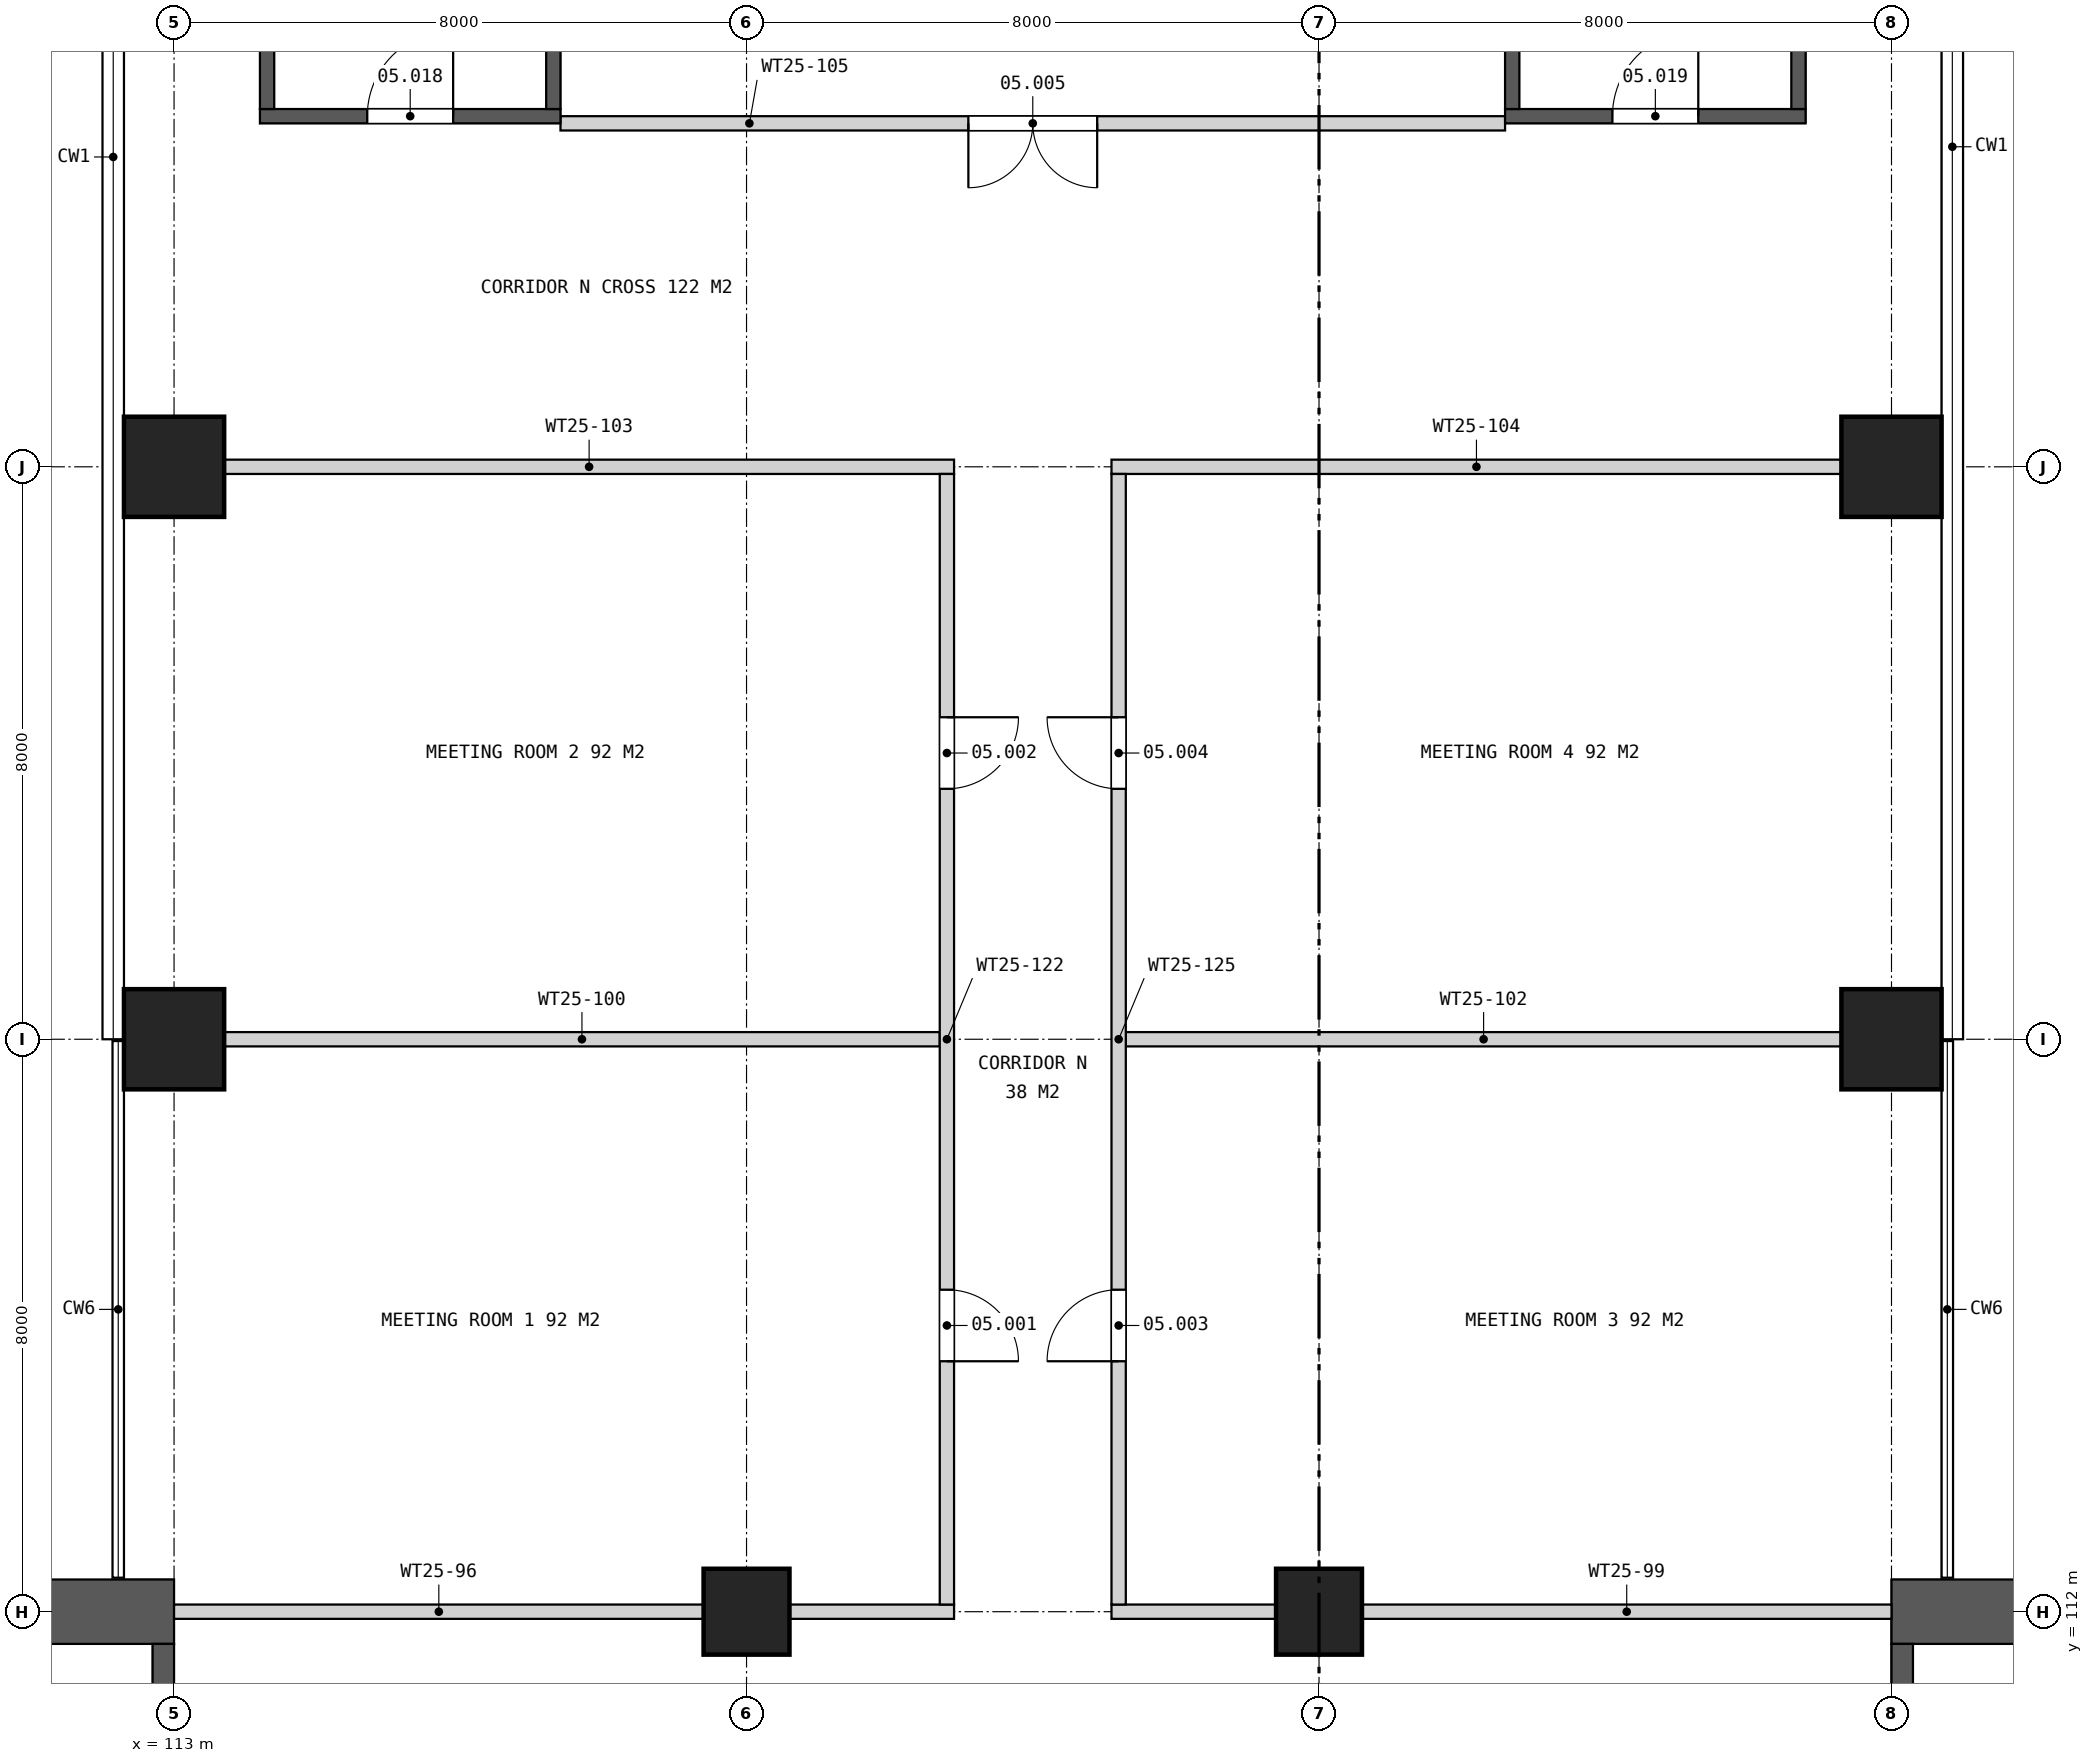
"""IFC4 building model, lengths in metres.
Left out: names, types, materials, properties, quantities, classifications, styles, units other than length and angle.
Written with IfcOpenShell. Run it as: python <this file> out.ifc"""

import sys

from ifc_helpers import new_model, si_unit, direction, frame, frame_2d, origin, origin_2d, place, context, subcontext, project, spatial, rectangle, extrude, element, fill, save


model = new_model("IFC4")
c1 = context("Model", 3, precision=1e-05, world=origin(), true_north=direction((0.0, 1.0)))
c2 = subcontext(c1, "Body", "Model", "MODEL_VIEW")
j1 = project(units=[si_unit("LENGTHUNIT", "METRE"), si_unit("PLANEANGLEUNIT", "RADIAN")], contexts=[c1])
p1 = place(None, origin())
s1 = spatial("IfcSite", under=j1, at=p1, CompositionType="ELEMENT")
p2 = place(p1, origin())
s2 = spatial("IfcBuilding", under=s1, at=p2, CompositionType="ELEMENT")
p3 = place(p2, frame((0.0, 0.0, 41.5)))
s3 = spatial("IfcBuildingStorey", under=s2, at=p3, CompositionType="ELEMENT", Elevation=41.5)
for number, where, z_axis, x_axis in (
    (1, (113.0, 120.0, 0.0), (0.0, 0.0, 1.0), (1.0, 0.0, 0.0)),
    (2, (113.0, 128.0, 0.0), (0.0, 0.0, 1.0), (1.0, 0.0, 0.0)),
):
    element("IfcColumn", number, at=place(p3, frame(where, z_axis=z_axis, x_axis=x_axis)), inside=s3, PredefinedType="COLUMN", context=c2, shape_type="SweptSolid", body=[
        extrude(rectangle(XDim=1.4, YDim=1.4, at=origin_2d()), origin(), (0.0, 0.0, 1.0), 6.0),
    ])
for number, where, z_axis, x_axis in (
    (3, (121.0, 112.0, 0.0), (0.0, 0.0, 1.0), (1.0, 0.0, 0.0)),
    (4, (129.0, 112.0, 0.0), (0.0, 0.0, 1.0), (1.0, 0.0, 0.0)),
):
    element("IfcColumn", number, at=place(p3, frame(where, z_axis=z_axis, x_axis=x_axis)), inside=s3, PredefinedType="COLUMN", context=c2, shape_type="SweptSolid", body=[
        extrude(rectangle(XDim=1.2, YDim=1.2, at=origin_2d()), origin(), (0.0, 0.0, 1.0), 6.0),
    ])
for number, where, z_axis, x_axis in (
    (5, (137.0, 120.0, 0.0), (0.0, 0.0, 1.0), (1.0, 0.0, 0.0)),
    (6, (137.0, 128.0, 0.0), (0.0, 0.0, 1.0), (1.0, 0.0, 0.0)),
):
    element("IfcColumn", number, at=place(p3, frame(where, z_axis=z_axis, x_axis=x_axis)), inside=s3, PredefinedType="COLUMN", context=c2, shape_type="SweptSolid", body=[
        extrude(rectangle(XDim=1.4, YDim=1.4, at=origin_2d()), origin(), (0.0, 0.0, 1.0), 6.0),
    ])
p4 = place(p3, frame((137.0, 112.0, 0.0), z_axis=(0.0, 0.0, 1.0), x_axis=(1.0, 0.0, 0.0)))
e7 = element("IfcWall", 7, at=p4, inside=s3, PredefinedType="SHEAR", context=c2, shape_type="SweptSolid", body=[
    extrude(rectangle(XDim=7.1, YDim=0.9, at=frame_2d((3.55, 0.0))), origin(), (0.0, 0.0, 1.0), 6.0),
])
p5 = place(p3, frame((137.15, 105.7, 0.0), z_axis=(0.0, 0.0, 1.0), x_axis=(0.0, 1.0, 0.0)))
e8 = element("IfcWall", 8, at=p5, inside=s3, PredefinedType="SHEAR", context=c2, shape_type="SweptSolid", body=[
    extrude(rectangle(XDim=5.85, YDim=0.3, at=frame_2d((2.925, 0.0))), origin(), (0.0, 0.0, 1.0), 6.0),
])
p6 = place(p3, frame((113.0, 112.0, 0.0), z_axis=(0.0, 0.0, 1.0), x_axis=(-1.0, 0.0, 0.0)))
e9 = element("IfcWall", 9, at=p6, inside=s3, PredefinedType="SHEAR", context=c2, shape_type="SweptSolid", body=[
    extrude(rectangle(XDim=7.1, YDim=0.9, at=frame_2d((3.55, 0.0))), origin(), (0.0, 0.0, 1.0), 6.0),
])
p7 = place(p3, frame((112.85, 111.55, 0.0), z_axis=(0.0, 0.0, 1.0), x_axis=(0.0, -1.0, 0.0)))
e10 = element("IfcWall", 10, at=p7, inside=s3, PredefinedType="SHEAR", context=c2, shape_type="SweptSolid", body=[
    extrude(rectangle(XDim=5.85, YDim=0.3, at=frame_2d((2.925, 0.0))), origin(), (0.0, 0.0, 1.0), 6.0),
])
p8 = place(p3, frame((113.0, 112.0, 0.0), z_axis=(0.0, 0.0, 1.0), x_axis=(1.0, 0.0, 0.0)))
e11 = element("IfcWall", 11, at=p8, inside=s3, PredefinedType="PARTITIONING", context=c2, shape_type="SweptSolid", body=[
    extrude(rectangle(XDim=7.4, YDim=0.2, at=frame_2d((3.7, 0.0))), origin(), (0.0, 0.0, 1.0), 5.055),
])
for number, where, z_axis, x_axis in (
    (12, (121.6, 112.0, 0.0), (0.0, 0.0, 1.0), (1.0, 0.0, 0.0)),
    (13, (126.1, 112.0, 0.0), (0.0, 0.0, 1.0), (1.0, 0.0, 0.0)),
):
    element("IfcWall", number, at=place(p3, frame(where, z_axis=z_axis, x_axis=x_axis)), inside=s3, PredefinedType="PARTITIONING", context=c2, shape_type="SweptSolid", body=[
        extrude(rectangle(XDim=2.3, YDim=0.2, at=frame_2d((1.15, 0.0))), origin(), (0.0, 0.0, 1.0), 5.061),
    ])
p9 = place(p3, frame((129.6, 112.0, 0.0), z_axis=(0.0, 0.0, 1.0), x_axis=(1.0, 0.0, 0.0)))
e14 = element("IfcWall", 14, at=p9, inside=s3, PredefinedType="PARTITIONING", context=c2, shape_type="SweptSolid", body=[
    extrude(rectangle(XDim=7.4, YDim=0.2, at=frame_2d((3.7, 0.0))), origin(), (0.0, 0.0, 1.0), 5.055),
])
for number, where, z_axis, x_axis in (
    (15, (113.7, 120.0, 0.0), (0.0, 0.0, 1.0), (1.0, 0.0, 0.0)),
    (16, (126.3, 120.0, 0.0), (0.0, 0.0, 1.0), (1.0, 0.0, 0.0)),
):
    element("IfcWall", number, at=place(p3, frame(where, z_axis=z_axis, x_axis=x_axis)), inside=s3, PredefinedType="PARTITIONING", context=c2, shape_type="SweptSolid", body=[
        extrude(rectangle(XDim=10.0, YDim=0.2, at=frame_2d((5.0, 0.0))), origin(), (0.0, 0.0, 1.0), 4.1),
    ])
for number, where, z_axis, x_axis in (
    (17, (113.7, 128.0, 0.0), (0.0, 0.0, 1.0), (1.0, 0.0, 0.0)),
    (18, (126.1, 128.0, 0.0), (0.0, 0.0, 1.0), (1.0, 0.0, 0.0)),
):
    element("IfcWall", number, at=place(p3, frame(where, z_axis=z_axis, x_axis=x_axis)), inside=s3, PredefinedType="PARTITIONING", context=c2, shape_type="SweptSolid", body=[
        extrude(rectangle(XDim=10.2, YDim=0.2, at=frame_2d((5.1, 0.0))), origin(), (0.0, 0.0, 1.0), 4.1),
    ])
p10 = place(p3, frame((118.4, 132.8, 0.0), z_axis=(0.0, 0.0, 1.0), x_axis=(1.0, 0.0, 0.0)))
e19 = element("IfcWall", 19, at=p10, inside=s3, PredefinedType="PARTITIONING", context=c2, shape_type="SweptSolid", body=[
    extrude(rectangle(XDim=13.2, YDim=0.2, at=frame_2d((6.6, 0.0))), origin(), (0.0, 0.0, 1.0), 5.143),
])
p11 = place(p10, frame((5.7, 0.0, 0.0)))
e20 = element("IfcOpeningElement", 20, at=p11, cuts=e19, PredefinedType="OPENING", context=c2, shape_type="SweptSolid", body=[
    extrude(rectangle(XDim=1.8, YDim=2.4, at=frame_2d((0.9, 1.2))), frame((0.0, 0.11, 0.0), z_axis=(0.0, -1.0, 0.0), x_axis=(1.0, 0.0, 0.0)), (0.0, 0.0, 1.0), 0.22),
])
p12 = place(p3, frame((114.2, 132.9, 0.0), z_axis=(0.0, 0.0, 1.0), x_axis=(1.0, 0.0, 0.0)))
e21 = element("IfcWall", 21, at=p12, inside=s3, PredefinedType="SOLIDWALL", context=c2, shape_type="SweptSolid", body=[
    extrude(rectangle(XDim=4.2, YDim=0.2, at=frame_2d((2.1, 0.0))), origin(), (0.0, 0.0, 1.0), 6.0),
])
p13 = place(p12, frame((1.5, 0.0, 0.0)))
e22 = element("IfcOpeningElement", 22, at=p13, cuts=e21, PredefinedType="OPENING", context=c2, shape_type="SweptSolid", body=[
    extrude(rectangle(XDim=1.2, YDim=2.2, at=frame_2d((0.6, 1.1))), frame((0.0, 0.11, 0.0), z_axis=(0.0, -1.0, 0.0), x_axis=(1.0, 0.0, 0.0)), (0.0, 0.0, 1.0), 0.22),
])
p14 = place(p3, frame((131.6, 132.9, 0.0), z_axis=(0.0, 0.0, 1.0), x_axis=(1.0, 0.0, 0.0)))
e23 = element("IfcWall", 23, at=p14, inside=s3, PredefinedType="SOLIDWALL", context=c2, shape_type="SweptSolid", body=[
    extrude(rectangle(XDim=4.2, YDim=0.2, at=frame_2d((2.1, 0.0))), origin(), (0.0, 0.0, 1.0), 6.0),
])
p15 = place(p14, frame((1.5, 0.0, 0.0)))
e24 = element("IfcOpeningElement", 24, at=p15, cuts=e23, PredefinedType="OPENING", context=c2, shape_type="SweptSolid", body=[
    extrude(rectangle(XDim=1.2, YDim=2.2, at=frame_2d((0.6, 1.1))), frame((0.0, 0.11, 0.0), z_axis=(0.0, -1.0, 0.0), x_axis=(1.0, 0.0, 0.0)), (0.0, 0.0, 1.0), 0.22),
])
for number, where, z_axis, x_axis in (
    (25, (114.3, 133.0, 0.0), (0.0, 0.0, 1.0), (0.0, 1.0, 0.0)),
    (26, (118.3, 133.0, 0.0), (0.0, 0.0, 1.0), (0.0, 1.0, 0.0)),
):
    element("IfcWall", number, at=place(p3, frame(where, z_axis=z_axis, x_axis=x_axis)), inside=s3, PredefinedType="SOLIDWALL", context=c2, shape_type="SweptSolid", body=[
        extrude(rectangle(XDim=11.6, YDim=0.2, at=frame_2d((5.8, 0.0))), origin(), (0.0, 0.0, 1.0), 6.0),
    ])
p16 = place(p3, frame((123.8, 112.1, 0.0), z_axis=(0.0, 0.0, 1.0), x_axis=(0.0, 1.0, 0.0)))
e27 = element("IfcWall", 27, at=p16, inside=s3, PredefinedType="PARTITIONING", context=c2, shape_type="SweptSolid", body=[
    extrude(rectangle(XDim=15.8, YDim=0.2, at=frame_2d((7.9, 0.0))), origin(), (0.0, 0.0, 1.0), 4.1),
])
p17 = place(p16, frame((3.4, 0.0, 0.0)))
e28 = element("IfcOpeningElement", 28, at=p17, cuts=e27, PredefinedType="OPENING", context=c2, shape_type="SweptSolid", body=[
    extrude(rectangle(XDim=1.0, YDim=2.1, at=frame_2d((0.5, 1.05))), frame((0.0, 0.11, 0.0), z_axis=(0.0, -1.0, 0.0), x_axis=(1.0, 0.0, 0.0)), (0.0, 0.0, 1.0), 0.22),
])
p18 = place(p16, frame((11.4, 0.0, 0.0)))
e29 = element("IfcOpeningElement", 29, at=p18, cuts=e27, PredefinedType="OPENING", context=c2, shape_type="SweptSolid", body=[
    extrude(rectangle(XDim=1.0, YDim=2.1, at=frame_2d((0.5, 1.05))), frame((0.0, 0.11, 0.0), z_axis=(0.0, -1.0, 0.0), x_axis=(1.0, 0.0, 0.0)), (0.0, 0.0, 1.0), 0.22),
])
p19 = place(p3, frame((126.2, 112.1, 0.0), z_axis=(0.0, 0.0, 1.0), x_axis=(0.0, 1.0, 0.0)))
e30 = element("IfcWall", 30, at=p19, inside=s3, PredefinedType="PARTITIONING", context=c2, shape_type="SweptSolid", body=[
    extrude(rectangle(XDim=15.8, YDim=0.2, at=frame_2d((7.9, 0.0))), origin(), (0.0, 0.0, 1.0), 4.1),
])
p20 = place(p19, frame((3.4, 0.0, 0.0)))
e31 = element("IfcOpeningElement", 31, at=p20, cuts=e30, PredefinedType="OPENING", context=c2, shape_type="SweptSolid", body=[
    extrude(rectangle(XDim=1.0, YDim=2.1, at=frame_2d((0.5, 1.05))), frame((0.0, 0.11, 0.0), z_axis=(0.0, -1.0, 0.0), x_axis=(1.0, 0.0, 0.0)), (0.0, 0.0, 1.0), 0.22),
])
p21 = place(p19, frame((11.4, 0.0, 0.0)))
e32 = element("IfcOpeningElement", 32, at=p21, cuts=e30, PredefinedType="OPENING", context=c2, shape_type="SweptSolid", body=[
    extrude(rectangle(XDim=1.0, YDim=2.1, at=frame_2d((0.5, 1.05))), frame((0.0, 0.11, 0.0), z_axis=(0.0, -1.0, 0.0), x_axis=(1.0, 0.0, 0.0)), (0.0, 0.0, 1.0), 0.22),
])
for number, where, z_axis, x_axis in (
    (33, (131.7, 133.0, 0.0), (0.0, 0.0, 1.0), (0.0, 1.0, 0.0)),
    (34, (135.7, 133.0, 0.0), (0.0, 0.0, 1.0), (0.0, 1.0, 0.0)),
):
    element("IfcWall", number, at=place(p3, frame(where, z_axis=z_axis, x_axis=x_axis)), inside=s3, PredefinedType="SOLIDWALL", context=c2, shape_type="SweptSolid", body=[
        extrude(rectangle(XDim=11.6, YDim=0.2, at=frame_2d((5.8, 0.0))), origin(), (0.0, 0.0, 1.0), 6.0),
    ])
p22 = place(p17, frame((1.0, 0.0, 0.0), z_axis=(0.0, 0.0, 1.0), x_axis=(-1.0, 0.0, 0.0)))
e35 = element("IfcDoor", 35, at=p22, inside=s3, OperationType="SINGLE_SWING_RIGHT", PredefinedType="DOOR", context=c2, shape_type="SweptSolid", body=[
    extrude(rectangle(XDim=1.0, YDim=2.1, at=frame_2d((0.5, 1.05))), frame((0.0, 0.025, 0.0), z_axis=(0.0, -1.0, 0.0), x_axis=(1.0, 0.0, 0.0)), (0.0, 0.0, 1.0), 0.05),
])
fill(e28, e35)
p23 = place(p18, frame((1.0, 0.0, 0.0), z_axis=(0.0, 0.0, 1.0), x_axis=(-1.0, 0.0, 0.0)))
e36 = element("IfcDoor", 36, at=p23, inside=s3, OperationType="SINGLE_SWING_LEFT", PredefinedType="DOOR", context=c2, shape_type="SweptSolid", body=[
    extrude(rectangle(XDim=1.0, YDim=2.1, at=frame_2d((0.5, 1.05))), frame((0.0, 0.025, 0.0), z_axis=(0.0, -1.0, 0.0), x_axis=(1.0, 0.0, 0.0)), (0.0, 0.0, 1.0), 0.05),
])
fill(e29, e36)
p24 = place(p20, origin())
e37 = element("IfcDoor", 37, at=p24, inside=s3, OperationType="SINGLE_SWING_LEFT", PredefinedType="DOOR", context=c2, shape_type="SweptSolid", body=[
    extrude(rectangle(XDim=1.0, YDim=2.1, at=frame_2d((0.5, 1.05))), frame((0.0, 0.025, 0.0), z_axis=(0.0, -1.0, 0.0), x_axis=(1.0, 0.0, 0.0)), (0.0, 0.0, 1.0), 0.05),
])
fill(e31, e37)
p25 = place(p21, origin())
e38 = element("IfcDoor", 38, at=p25, inside=s3, OperationType="SINGLE_SWING_RIGHT", PredefinedType="DOOR", context=c2, shape_type="SweptSolid", body=[
    extrude(rectangle(XDim=1.0, YDim=2.1, at=frame_2d((0.5, 1.05))), frame((0.0, 0.025, 0.0), z_axis=(0.0, -1.0, 0.0), x_axis=(1.0, 0.0, 0.0)), (0.0, 0.0, 1.0), 0.05),
])
fill(e32, e38)
p26 = place(p11, frame((1.8, 0.0, 0.0), z_axis=(0.0, 0.0, 1.0), x_axis=(-1.0, 0.0, 0.0)))
e39 = element("IfcDoor", 39, at=p26, inside=s3, OperationType="DOUBLE_DOOR_SINGLE_SWING", PredefinedType="DOOR", context=c2, shape_type="SweptSolid", body=[
    extrude(rectangle(XDim=1.8, YDim=2.4, at=frame_2d((0.9, 1.2))), frame((0.0, 0.025, 0.0), z_axis=(0.0, -1.0, 0.0), x_axis=(1.0, 0.0, 0.0)), (0.0, 0.0, 1.0), 0.05),
])
fill(e20, e39)
p27 = place(p13, origin())
e40 = element("IfcDoor", 40, at=p27, inside=s3, OperationType="SINGLE_SWING_RIGHT", PredefinedType="DOOR", context=c2, shape_type="SweptSolid", body=[
    extrude(rectangle(XDim=1.2, YDim=2.2, at=frame_2d((0.6, 1.1))), frame((0.0, 0.025, 0.0), z_axis=(0.0, -1.0, 0.0), x_axis=(1.0, 0.0, 0.0)), (0.0, 0.0, 1.0), 0.05),
])
fill(e22, e40)
p28 = place(p15, origin())
e41 = element("IfcDoor", 41, at=p28, inside=s3, OperationType="SINGLE_SWING_RIGHT", PredefinedType="DOOR", context=c2, shape_type="SweptSolid", body=[
    extrude(rectangle(XDim=1.2, YDim=2.2, at=frame_2d((0.6, 1.1))), frame((0.0, 0.025, 0.0), z_axis=(0.0, -1.0, 0.0), x_axis=(1.0, 0.0, 0.0)), (0.0, 0.0, 1.0), 0.05),
])
fill(e24, e41)
save(model, sys.argv[1])
